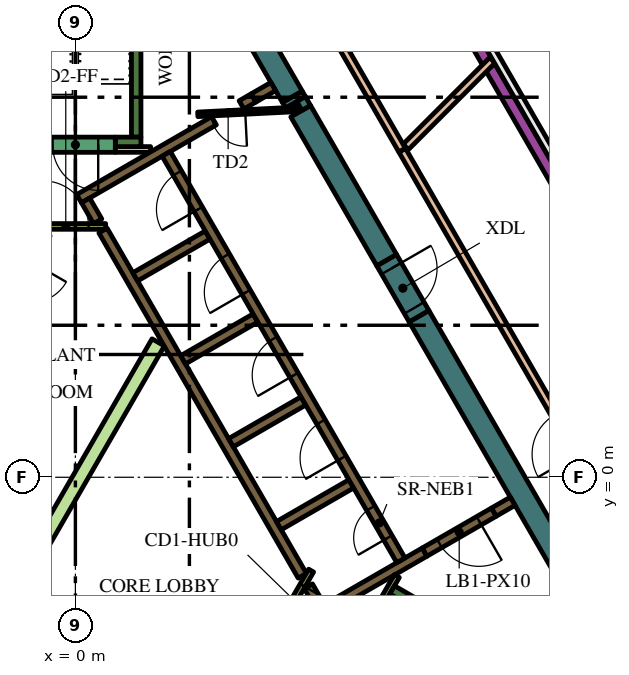
"""IFC4 building model, lengths in metres.
Left out: names, types, materials, properties, quantities, classifications, styles, units other than length and angle.
Written with IfcOpenShell. Run it as: python <this file> out.ifc"""

import sys

from ifc_helpers import new_model, si_unit, direction, frame, frame_2d, origin, place, context, subcontext, project, spatial, polyline, rectangle, outline, extrude, element, fill, save


model = new_model("IFC4")
c1 = context("Model", 3, precision=1e-05, world=origin(), true_north=direction((0.0, 1.0)))
c2 = subcontext(c1, "Body", "Model", "MODEL_VIEW")
j1 = project(units=[si_unit("LENGTHUNIT", "METRE"), si_unit("PLANEANGLEUNIT", "RADIAN")], contexts=[c1])
p1 = place(None, origin())
s1 = spatial("IfcSite", under=j1, at=p1, CompositionType="ELEMENT")
p2 = place(p1, origin())
s2 = spatial("IfcBuilding", under=s1, at=p2, CompositionType="ELEMENT")
p3 = place(p2, frame((0.0, 0.0, 340.2)))
s3 = spatial("IfcBuildingStorey", under=s2, at=p3, CompositionType="ELEMENT", Elevation=340.2)
p4 = place(p3, frame((9.042, 4.239, 0.0), z_axis=(0.0, 0.0, 1.0), x_axis=(0.500005785455, -0.866022063525, 0.0)))
e1 = element("IfcWall", 1, at=p4, inside=s3, PredefinedType="SOLIDWALL", context=c2, shape_type="SweptSolid", body=[
    extrude(rectangle(XDim=12.406, YDim=0.6, at=frame_2d((6.203, 0.0))), origin(), (0.0, 0.0, 1.0), 4.2),
])
p5 = place(p3, frame((5.709, 10.012, 0.0), z_axis=(0.0, 0.0, 1.0), x_axis=(0.500399834964, -0.865794435861, 0.0)))
e2 = element("IfcWall", 2, at=p5, inside=s3, PredefinedType="SOLIDWALL", context=c2, shape_type="SweptSolid", body=[
    extrude(rectangle(XDim=0.166, YDim=0.6, at=frame_2d((0.083, 0.0))), origin(), (0.0, 0.0, 1.0), 4.2),
])
p6 = place(p3, frame((5.928, 9.633, 0.0), z_axis=(0.0, 0.0, 1.0), x_axis=(0.499983823482, -0.8660347431, 0.0)))
e3 = element("IfcWall", 3, at=p6, inside=s3, PredefinedType="SOLIDWALL", context=c2, shape_type="SweptSolid", body=[
    extrude(rectangle(XDim=4.528, YDim=0.6, at=frame_2d((2.264, 0.0))), origin(), (0.0, 0.0, 1.0), 4.2),
])
p7 = place(p3, origin())
e4 = element("IfcWall", 4, at=p7, inside=s3, PredefinedType="SOLIDWALL", context=c2, shape_type="SweptSolid", body=[
    extrude(outline(polyline([(6.053, 10.016), (6.187, 9.784), (5.961, 9.654), (5.827, 9.886), (6.053, 10.016)])), origin(), (0.0, 0.0, 1.0), 4.2),
])
p8 = place(p3, frame((1.989, 16.456, 0.0), z_axis=(0.0, 0.0, 1.0), x_axis=(0.499990476767, -0.866030901956, 0.0)))
e5 = element("IfcWall", 5, at=p8, inside=s3, PredefinedType="SOLIDWALL", context=c2, shape_type="SweptSolid", body=[
    extrude(rectangle(XDim=7.438, YDim=0.6, at=frame_2d((3.719, 0.0))), origin(), (0.0, 0.0, 1.0), 4.2),
])
p9 = place(p3, frame((8.334, -2.964, 0.0), z_axis=(0.0, 0.0, 1.0), x_axis=(0.866016039709, -0.500016218704, 0.0)))
e6 = element("IfcWall", 6, at=p9, inside=s3, PredefinedType="SOLIDWALL", context=c2, shape_type="SweptSolid", body=[
    extrude(rectangle(XDim=7.05, YDim=0.25, at=frame_2d((3.525, 0.0))), origin(), (0.0, 0.0, 1.0), 4.2),
])
p10 = place(p3, frame((8.168, -3.503, 0.0), z_axis=(0.0, 0.0, 1.0), x_axis=(0.49972245349, 0.866185586049, 0.0)))
e7 = element("IfcWall", 7, at=p10, inside=s3, PredefinedType="SOLIDWALL", context=c2, shape_type="SweptSolid", body=[
    extrude(rectangle(XDim=0.425, YDim=0.25, at=frame_2d((0.212, 0.0))), origin(), (0.0, 0.0, 1.0), 4.2),
])
p11 = place(p3, frame((1.6, 8.95, 0.0), z_axis=(0.0, 0.0, 1.0), x_axis=(0.0, 1.0, 0.0)))
e8 = element("IfcWall", 8, at=p11, inside=s3, PredefinedType="SOLIDWALL", context=c2, shape_type="SweptSolid", body=[
    extrude(rectangle(XDim=6.8, YDim=0.25, at=frame_2d((3.4, 0.0))), origin(), (0.0, 0.0, 1.0), 4.2),
])
p12 = place(p3, frame((1.05, 8.825, 0.0), z_axis=(0.0, 0.0, 1.0), x_axis=(1.0, 0.0, 0.0)))
e9 = element("IfcWall", 9, at=p12, inside=s3, PredefinedType="SOLIDWALL", context=c2, shape_type="SweptSolid", body=[
    extrude(rectangle(XDim=0.675, YDim=0.25, at=frame_2d((0.337, 0.0))), origin(), (0.0, 0.0, 1.0), 4.2),
])
p13 = place(p3, frame((9.19, -1.969, 0.0), z_axis=(0.0, 0.0, 1.0), x_axis=(-0.866057109641, -0.499945079824, 0.0)))
e10 = element("IfcWall", 10, at=p13, inside=s3, PredefinedType="SOLIDWALL", context=c2, shape_type="SweptSolid", body=[
    extrude(rectangle(XDim=3.291, YDim=0.25, at=frame_2d((1.646, 0.0))), origin(), (0.0, 0.0, 1.0), 4.2),
])
p14 = place(p3, frame((6.13, -2.867, 0.0), z_axis=(0.0, 0.0, 1.0), x_axis=(0.500160776593, -0.865932559475, 0.0)))
e11 = element("IfcWall", 11, at=p14, inside=s3, PredefinedType="SOLIDWALL", context=c2, shape_type="SweptSolid", body=[
    extrude(rectangle(XDim=0.627, YDim=0.25, at=frame_2d((0.313, 0.0))), origin(), (0.0, 0.0, 1.0), 4.2),
])
p15 = place(p3, frame((11.507, -0.631, 0.0), z_axis=(0.0, 0.0, 1.0), x_axis=(-0.866093731455, -0.499881634324, 0.0)))
e12 = element("IfcWall", 12, at=p15, inside=s3, PredefinedType="SOLIDWALL", context=c2, shape_type="SweptSolid", body=[
    extrude(rectangle(XDim=0.575, YDim=0.25, at=frame_2d((0.288, 0.0))), origin(), (0.0, 0.0, 1.0), 4.2),
])
p16 = place(p3, frame((3.647, 9.38, 0.0), z_axis=(0.0, 0.0, 1.0), x_axis=(-0.866027868628, -0.499995730742, 0.0)))
e13 = element("IfcWall", 13, at=p16, inside=s3, PredefinedType="SOLIDWALL", context=c2, shape_type="SweptSolid", body=[
    extrude(rectangle(XDim=4.099, YDim=0.25, at=frame_2d((2.049, 0.0))), origin(), (0.0, 0.0, 1.0), 4.2),
])
p17 = place(p3, frame((0.268, 7.285, 0.0), z_axis=(0.0, 0.0, 1.0), x_axis=(0.500098681536, -0.865968422476, 0.0)))
e14 = element("IfcWall", 14, at=p17, inside=s3, PredefinedType="SOLIDWALL", context=c2, shape_type="SweptSolid", body=[
    extrude(rectangle(XDim=0.636, YDim=0.25, at=frame_2d((0.318, 0.0))), origin(), (0.0, 0.0, 1.0), 4.2),
])
p18 = place(p3, frame((5.97, -2.591, 0.0), z_axis=(0.0, 0.0, 1.0), x_axis=(-0.499994469932, 0.866028596547, 0.0)))
e15 = element("IfcWall", 15, at=p18, inside=s3, PredefinedType="SOLIDWALL", context=c2, shape_type="SweptSolid", body=[
    extrude(rectangle(XDim=10.488, YDim=0.25, at=frame_2d((5.244, 0.0))), origin(), (0.0, 0.0, 1.0), 4.2),
])
p19 = place(p3, frame((1.574, 5.274, 0.0), z_axis=(0.0, 0.0, 1.0), x_axis=(0.866028486751, 0.499994660107, 0.0)))
e16 = element("IfcWall", 16, at=p19, inside=s3, PredefinedType="SOLIDWALL", context=c2, shape_type="SweptSolid", body=[
    extrude(rectangle(XDim=2.2, YDim=0.25, at=frame_2d((1.1, 0.0))), origin(), (0.0, 0.0, 1.0), 4.2),
])
for number, where, z_axis, x_axis in (
    (17, (2.834, 3.091, 0.0), (0.0, 0.0, 1.0), (0.866, 0.5, 0.0)),
    (18, (4.094, 0.909, 0.0), (0.0, 0.0, 1.0), (0.866, 0.5, 0.0)),
    (19, (5.354, -1.274, 0.0), (0.0, 0.0, 1.0), (0.866, 0.5, 0.0)),
):
    element("IfcWall", number, at=place(p3, frame(where, z_axis=z_axis, x_axis=x_axis)), inside=s3, PredefinedType="SOLIDWALL", context=c2, shape_type="SweptSolid", body=[
        extrude(rectangle(XDim=2.2, YDim=0.25, at=frame_2d((1.1, 0.0))), origin(), (0.0, 0.0, 1.0), 4.2),
    ])
p20 = place(p3, frame((4.688, 9.981, 0.0), z_axis=(0.0, 0.0, 1.0), x_axis=(-0.865974312977, -0.500088481434, 0.0)))
e20 = element("IfcWall", 20, at=p20, inside=s3, PredefinedType="SOLIDWALL", context=c2, shape_type="SweptSolid", body=[
    extrude(rectangle(XDim=0.366, YDim=0.25, at=frame_2d((0.183, 0.0))), origin(), (0.0, 0.0, 1.0), 4.2),
])
p21 = place(p3, frame((4.689, 9.982, 0.0), z_axis=(0.0, 0.0, 1.0), x_axis=(0.865947592822, 0.500134748329, 0.0)))
e21 = element("IfcWall", 21, at=p21, inside=s3, PredefinedType="SOLIDWALL", context=c2, shape_type="SweptSolid", body=[
    extrude(rectangle(XDim=0.598, YDim=0.25, at=frame_2d((0.299, 0.0))), origin(), (0.0, 0.0, 1.0), 4.2),
])
p22 = place(p3, frame((1.05, 8.625, 0.0), z_axis=(0.0, 0.0, 1.0), x_axis=(1.0, 0.0, 0.0)))
e22 = element("IfcWall", 22, at=p22, inside=s3, PredefinedType="PARTITIONING", context=c2, shape_type="SweptSolid", body=[
    extrude(rectangle(XDim=0.929, YDim=0.15, at=frame_2d((0.464, 0.0))), origin(), (0.0, 0.0, 1.0), 3.45),
])
p23 = place(p3, frame((8.459, -2.599, 0.0), z_axis=(0.0, 0.0, 1.0), x_axis=(-0.500041054325, -0.866001699761, 0.0)))
e23 = element("IfcWall", 23, at=p23, inside=s3, PredefinedType="PARTITIONING", context=c2, shape_type="SweptSolid", body=[
    extrude(rectangle(XDim=0.929, YDim=0.15, at=frame_2d((0.464, 0.0))), origin(), (0.0, 0.0, 1.0), 4.2),
])
e24 = element("IfcWall", 24, at=p7, inside=s3, PredefinedType="PARTITIONING", context=c2, shape_type="SweptSolid", body=[
    extrude(outline(polyline([(2.017, 3.643), (2.342, 3.456), (-1.822, -3.756), (-2.147, -3.568), (2.017, 3.643)])), origin(), (0.0, 0.0, 1.0), 3.45),
])
p24 = place(p3, frame((8.565, -2.185, 0.0), z_axis=(0.0, 0.0, 1.0), x_axis=(-0.499997954832, 0.866026584559, 0.0)))
e25 = element("IfcWall", 25, at=p24, inside=s3, PredefinedType="SOLIDWALL", context=c2, shape_type="SweptSolid", body=[
    extrude(rectangle(XDim=12.35, YDim=0.25, at=frame_2d((6.175, 0.0))), origin(), (0.0, 0.0, 1.0), 4.2),
])
p25 = place(p24, frame((0.685, 0.0, 0.0)))
e26 = element("IfcOpeningElement", 26, at=p25, cuts=e25, PredefinedType="OPENING", context=c2, shape_type="SweptSolid", body=[
    extrude(rectangle(XDim=0.9, YDim=2.1, at=frame_2d((0.45, 1.05))), frame((0.0, 0.135, 0.0), z_axis=(0.0, -1.0, 0.0), x_axis=(1.0, 0.0, 0.0)), (0.0, 0.0, 1.0), 0.27),
])
p26 = place(p24, frame((3.105, 0.0, 0.0)))
e27 = element("IfcOpeningElement", 27, at=p26, cuts=e25, PredefinedType="OPENING", context=c2, shape_type="SweptSolid", body=[
    extrude(rectangle(XDim=1.1, YDim=2.1, at=frame_2d((0.55, 1.05))), frame((0.0, 0.135, 0.0), z_axis=(0.0, -1.0, 0.0), x_axis=(1.0, 0.0, 0.0)), (0.0, 0.0, 1.0), 0.27),
])
p27 = place(p24, frame((5.625, 0.0, 0.0)))
e28 = element("IfcOpeningElement", 28, at=p27, cuts=e25, PredefinedType="OPENING", context=c2, shape_type="SweptSolid", body=[
    extrude(rectangle(XDim=1.1, YDim=2.1, at=frame_2d((0.55, 1.05))), frame((0.0, 0.135, 0.0), z_axis=(0.0, -1.0, 0.0), x_axis=(1.0, 0.0, 0.0)), (0.0, 0.0, 1.0), 0.27),
])
p28 = place(p24, frame((8.145, 0.0, 0.0)))
e29 = element("IfcOpeningElement", 29, at=p28, cuts=e25, PredefinedType="OPENING", context=c2, shape_type="SweptSolid", body=[
    extrude(rectangle(XDim=1.1, YDim=2.1, at=frame_2d((0.55, 1.05))), frame((0.0, 0.135, 0.0), z_axis=(0.0, -1.0, 0.0), x_axis=(1.0, 0.0, 0.0)), (0.0, 0.0, 1.0), 0.27),
])
p29 = place(p24, frame((10.665, 0.0, 0.0)))
e30 = element("IfcOpeningElement", 30, at=p29, cuts=e25, PredefinedType="OPENING", context=c2, shape_type="SweptSolid", body=[
    extrude(rectangle(XDim=1.1, YDim=2.1, at=frame_2d((0.55, 1.05))), frame((0.0, 0.135, 0.0), z_axis=(0.0, -1.0, 0.0), x_axis=(1.0, 0.0, 0.0)), (0.0, 0.0, 1.0), 0.27),
])
p30 = place(p3, frame((1.05, 8.75, 0.0), z_axis=(0.0, 0.0, 1.0), x_axis=(-1.0, 0.0, 0.0)))
e31 = element("IfcWall", 31, at=p30, inside=s3, PredefinedType="SOLIDWALL", context=c2, shape_type="SweptSolid", body=[
    extrude(rectangle(XDim=2.1, YDim=0.4, at=frame_2d((1.05, 0.0))), origin(), (0.0, 0.0, 1.0), 4.2),
])
p31 = place(p30, frame((0.45, 0.0, 0.0)))
e32 = element("IfcOpeningElement", 32, at=p31, cuts=e31, PredefinedType="OPENING", context=c2, shape_type="SweptSolid", body=[
    extrude(rectangle(XDim=1.2, YDim=2.1, at=frame_2d((0.6, 1.05))), frame((0.0, 0.21, 0.0), z_axis=(0.0, -1.0, 0.0), x_axis=(1.0, 0.0, 0.0)), (0.0, 0.0, 1.0), 0.42),
])
p32 = place(p3, frame((5.917, 9.684, 0.0), z_axis=(0.0, 0.0, 1.0), x_axis=(-0.998758194515, -0.049820366212, 0.0)))
e33 = element("IfcWall", 33, at=p32, inside=s3, PredefinedType="PARTITIONING", context=c2, shape_type="SweptSolid", body=[
    extrude(rectangle(XDim=2.7, YDim=0.12, at=frame_2d((1.35, 0.0))), origin(), (0.0, 0.0, 1.0), 3.45),
])
p33 = place(p32, frame((1.45, 0.0, 0.0)))
e34 = element("IfcOpeningElement", 34, at=p33, cuts=e33, PredefinedType="OPENING", context=c2, shape_type="SweptSolid", body=[
    extrude(rectangle(XDim=0.9, YDim=2.1, at=frame_2d((0.45, 1.05))), frame((0.0, 0.07, 0.0), z_axis=(0.0, -1.0, 0.0), x_axis=(1.0, 0.0, 0.0)), (0.0, 0.0, 1.0), 0.14),
])
p34 = place(p3, frame((6.203, -2.456, 0.0), z_axis=(0.0, 0.0, 1.0), x_axis=(-0.500043961785, -0.866000020948, 0.0)))
e35 = element("IfcWall", 35, at=p34, inside=s3, PredefinedType="PARTITIONING", context=c2, shape_type="SweptSolid", body=[
    extrude(rectangle(XDim=1.95, YDim=0.15, at=frame_2d((0.975, 0.0))), origin(), (0.0, 0.0, 1.0), 4.2),
])
p35 = place(p34, frame((0.45, 0.0, 0.0)))
e36 = element("IfcOpeningElement", 36, at=p35, cuts=e35, PredefinedType="OPENING", context=c2, shape_type="SweptSolid", body=[
    extrude(rectangle(XDim=0.9, YDim=2.1, at=frame_2d((0.45, 1.05))), frame((0.0, 0.085, 0.0), z_axis=(0.0, -1.0, 0.0), x_axis=(1.0, 0.0, 0.0)), (0.0, 0.0, 1.0), 0.17),
])
p36 = place(p3, frame((-1.303, 6.6, 0.0), z_axis=(0.0, 0.0, 1.0), x_axis=(1.0, 0.0, 0.0)))
e37 = element("IfcWall", 37, at=p36, inside=s3, PredefinedType="PARTITIONING", context=c2, shape_type="SweptSolid", body=[
    extrude(rectangle(XDim=2.1, YDim=0.15, at=frame_2d((1.05, 0.0))), origin(), (0.0, 0.0, 1.0), 4.2),
])
p37 = place(p36, frame((0.45, 0.0, 0.0)))
e38 = element("IfcOpeningElement", 38, at=p37, cuts=e37, PredefinedType="OPENING", context=c2, shape_type="SweptSolid", body=[
    extrude(rectangle(XDim=1.2, YDim=2.1, at=frame_2d((0.6, 1.05))), frame((0.0, 0.085, 0.0), z_axis=(0.0, -1.0, 0.0), x_axis=(1.0, 0.0, 0.0)), (0.0, 0.0, 1.0), 0.17),
])
p38 = place(p3, frame((11.009, -0.919, 0.0), z_axis=(0.0, 0.0, 1.0), x_axis=(-0.866059744384, -0.49994051562, 0.0)))
e39 = element("IfcWall", 39, at=p38, inside=s3, PredefinedType="SOLIDWALL", context=c2, shape_type="SweptSolid", body=[
    extrude(rectangle(XDim=2.1, YDim=0.25, at=frame_2d((1.05, 0.0))), origin(), (0.0, 0.0, 1.0), 4.2),
])
p39 = place(p38, frame((0.45, 0.0, 0.0)))
e40 = element("IfcOpeningElement", 40, at=p39, cuts=e39, PredefinedType="OPENING", context=c2, shape_type="SweptSolid", body=[
    extrude(rectangle(XDim=1.2, YDim=2.1, at=frame_2d((0.6, 1.05))), frame((0.0, 0.135, 0.0), z_axis=(0.0, -1.0, 0.0), x_axis=(1.0, 0.0, 0.0)), (0.0, 0.0, 1.0), 0.27),
])
p40 = place(p3, frame((8.192, 5.711, 0.0), z_axis=(0.0, 0.0, 1.0), x_axis=(0.500062241894, -0.865989465428, 0.0)))
e41 = element("IfcWall", 41, at=p40, inside=s3, PredefinedType="SOLIDWALL", context=c2, shape_type="SweptSolid", body=[
    extrude(rectangle(XDim=1.7, YDim=0.6, at=frame_2d((0.85, 0.0))), origin(), (0.0, 0.0, 1.0), 4.2),
])
p41 = place(p40, frame((0.25, 0.0, 0.0)))
e42 = element("IfcOpeningElement", 42, at=p41, cuts=e41, PredefinedType="OPENING", context=c2, shape_type="SweptSolid", body=[
    extrude(rectangle(XDim=1.2, YDim=2.1, at=frame_2d((0.6, 1.05))), frame((0.0, 0.31, 0.0), z_axis=(0.0, -1.0, 0.0), x_axis=(1.0, 0.0, 0.0)), (0.0, 0.0, 1.0), 0.62),
])
p42 = place(p3, frame((17.234, -6.35, 0.0), z_axis=(0.0, 0.0, 1.0), x_axis=(-0.499992973356, 0.866029460581, 0.0)))
e43 = element("IfcWall", 43, at=p42, inside=s3, PredefinedType="PARTITIONING", context=c2, shape_type="SweptSolid", body=[
    extrude(rectangle(XDim=17.265, YDim=0.2, at=frame_2d((8.632, 0.0))), origin(), (0.0, 0.0, 1.0), 3.45),
])
p43 = place(p42, frame((8.032, 0.0, 0.0)))
e44 = element("IfcOpeningElement", 44, at=p43, cuts=e43, PredefinedType="OPENING", context=c2, shape_type="SweptSolid", body=[
    extrude(rectangle(XDim=1.2, YDim=2.1, at=frame_2d((0.6, 1.05))), frame((0.0, 0.11, 0.0), z_axis=(0.0, -1.0, 0.0), x_axis=(1.0, 0.0, 0.0)), (0.0, 0.0, 1.0), 0.22),
])
p44 = place(p3, frame((8.597, 8.61, 0.0), z_axis=(0.0, 0.0, 1.0), x_axis=(-0.499996953601, 0.866027162616, 0.0)))
e45 = element("IfcWall", 45, at=p44, inside=s3, PredefinedType="PARTITIONING", context=c2, shape_type="SweptSolid", body=[
    extrude(rectangle(XDim=10.958, YDim=0.2, at=frame_2d((5.479, 0.0))), origin(), (0.0, 0.0, 1.0), 3.45),
])
p45 = place(p44, frame((4.879, 0.0, 0.0)))
e46 = element("IfcOpeningElement", 46, at=p45, cuts=e45, PredefinedType="OPENING", context=c2, shape_type="SweptSolid", body=[
    extrude(rectangle(XDim=1.2, YDim=2.1, at=frame_2d((0.6, 1.05))), frame((0.0, 0.11, 0.0), z_axis=(0.0, -1.0, 0.0), x_axis=(1.0, 0.0, 0.0)), (0.0, 0.0, 1.0), 0.22),
])
p46 = place(p3, frame((8.694, 8.694, 0.0), z_axis=(0.0, 0.0, 1.0), x_axis=(0.707106781187, 0.707106781187, 0.0)))
e47 = element("IfcWall", 47, at=p46, inside=s3, PredefinedType="PARTITIONING", context=c2, shape_type="SweptSolid", body=[
    extrude(rectangle(XDim=3.224, YDim=0.2, at=frame_2d((1.612, 0.0))), origin(), (0.0, 0.0, 1.0), 3.45),
])
p47 = place(p3, frame((18.181, -1.79, 0.0), z_axis=(0.0, 0.0, 1.0), x_axis=(-0.500002158106, 0.866024157798, 0.0)))
e48 = element("IfcWall", 48, at=p47, inside=s3, PredefinedType="SOLIDWALL", context=c2, shape_type="SweptSolid", body=[
    extrude(rectangle(XDim=21.282, YDim=0.3, at=frame_2d((10.641, 0.0))), origin(), (0.0, 0.0, 1.0), 3.45),
])
p48 = place(p25, origin())
e49 = element("IfcDoor", 49, at=p48, inside=s3, OperationType="SINGLE_SWING_LEFT", PredefinedType="DOOR", context=c2, shape_type="SweptSolid", body=[
    extrude(rectangle(XDim=0.9, YDim=2.1, at=frame_2d((0.45, 1.05))), frame((0.0, 0.025, 0.0), z_axis=(0.0, -1.0, 0.0), x_axis=(1.0, 0.0, 0.0)), (0.0, 0.0, 1.0), 0.05),
])
fill(e26, e49)
p49 = place(p26, origin())
e50 = element("IfcDoor", 50, at=p49, inside=s3, OperationType="DOUBLE_DOOR_SLIDING", PredefinedType="DOOR", context=c2, shape_type="SweptSolid", body=[
    extrude(rectangle(XDim=1.1, YDim=2.1, at=frame_2d((0.55, 1.05))), frame((0.0, 0.025, 0.0), z_axis=(0.0, -1.0, 0.0), x_axis=(1.0, 0.0, 0.0)), (0.0, 0.0, 1.0), 0.05),
])
fill(e27, e50)
p50 = place(p27, origin())
e51 = element("IfcDoor", 51, at=p50, inside=s3, OperationType="DOUBLE_DOOR_SLIDING", PredefinedType="DOOR", context=c2, shape_type="SweptSolid", body=[
    extrude(rectangle(XDim=1.1, YDim=2.1, at=frame_2d((0.55, 1.05))), frame((0.0, 0.025, 0.0), z_axis=(0.0, -1.0, 0.0), x_axis=(1.0, 0.0, 0.0)), (0.0, 0.0, 1.0), 0.05),
])
fill(e28, e51)
p51 = place(p28, origin())
e52 = element("IfcDoor", 52, at=p51, inside=s3, OperationType="DOUBLE_DOOR_SLIDING", PredefinedType="DOOR", context=c2, shape_type="SweptSolid", body=[
    extrude(rectangle(XDim=1.1, YDim=2.1, at=frame_2d((0.55, 1.05))), frame((0.0, 0.025, 0.0), z_axis=(0.0, -1.0, 0.0), x_axis=(1.0, 0.0, 0.0)), (0.0, 0.0, 1.0), 0.05),
])
fill(e29, e52)
p52 = place(p29, origin())
e53 = element("IfcDoor", 53, at=p52, inside=s3, OperationType="DOUBLE_DOOR_SLIDING", PredefinedType="DOOR", context=c2, shape_type="SweptSolid", body=[
    extrude(rectangle(XDim=1.1, YDim=2.1, at=frame_2d((0.55, 1.05))), frame((0.0, 0.025, 0.0), z_axis=(0.0, -1.0, 0.0), x_axis=(1.0, 0.0, 0.0)), (0.0, 0.0, 1.0), 0.05),
])
fill(e30, e53)
p53 = place(p31, origin())
e54 = element("IfcDoor", 54, at=p53, inside=s3, OperationType="SINGLE_SWING_LEFT", PredefinedType="DOOR", context=c2, shape_type="SweptSolid", body=[
    extrude(rectangle(XDim=1.2, YDim=2.1, at=frame_2d((0.6, 1.05))), frame((0.0, 0.025, 0.0), z_axis=(0.0, -1.0, 0.0), x_axis=(1.0, 0.0, 0.0)), (0.0, 0.0, 1.0), 0.05),
])
fill(e32, e54)
p54 = place(p33, origin())
e55 = element("IfcDoor", 55, at=p54, inside=s3, OperationType="SINGLE_SWING_LEFT", PredefinedType="DOOR", context=c2, shape_type="SweptSolid", body=[
    extrude(rectangle(XDim=0.9, YDim=2.1, at=frame_2d((0.45, 1.05))), frame((0.0, 0.025, 0.0), z_axis=(0.0, -1.0, 0.0), x_axis=(1.0, 0.0, 0.0)), (0.0, 0.0, 1.0), 0.05),
])
fill(e34, e55)
p55 = place(p35, origin())
e56 = element("IfcDoor", 56, at=p55, inside=s3, OperationType="SINGLE_SWING_LEFT", PredefinedType="DOOR", context=c2, shape_type="SweptSolid", body=[
    extrude(rectangle(XDim=0.9, YDim=2.1, at=frame_2d((0.45, 1.05))), frame((0.0, 0.025, 0.0), z_axis=(0.0, -1.0, 0.0), x_axis=(1.0, 0.0, 0.0)), (0.0, 0.0, 1.0), 0.05),
])
fill(e36, e56)
p56 = place(p37, origin())
e57 = element("IfcDoor", 57, at=p56, inside=s3, OperationType="SINGLE_SWING_LEFT", PredefinedType="DOOR", context=c2, shape_type="SweptSolid", body=[
    extrude(rectangle(XDim=1.2, YDim=2.1, at=frame_2d((0.6, 1.05))), frame((0.0, 0.025, 0.0), z_axis=(0.0, -1.0, 0.0), x_axis=(1.0, 0.0, 0.0)), (0.0, 0.0, 1.0), 0.05),
])
fill(e38, e57)
p57 = place(p39, origin())
e58 = element("IfcDoor", 58, at=p57, inside=s3, OperationType="SINGLE_SWING_LEFT", PredefinedType="DOOR", context=c2, shape_type="SweptSolid", body=[
    extrude(rectangle(XDim=1.2, YDim=2.1, at=frame_2d((0.6, 1.05))), frame((0.0, 0.025, 0.0), z_axis=(0.0, -1.0, 0.0), x_axis=(1.0, 0.0, 0.0)), (0.0, 0.0, 1.0), 0.05),
])
fill(e40, e58)
p58 = place(p41, origin())
e59 = element("IfcDoor", 59, at=p58, inside=s3, OperationType="SINGLE_SWING_LEFT", PredefinedType="DOOR", context=c2, shape_type="SweptSolid", body=[
    extrude(rectangle(XDim=1.2, YDim=2.1, at=frame_2d((0.6, 1.05))), frame((0.0, 0.025, 0.0), z_axis=(0.0, -1.0, 0.0), x_axis=(1.0, 0.0, 0.0)), (0.0, 0.0, 1.0), 0.05),
])
fill(e42, e59)
save(model, sys.argv[1])
